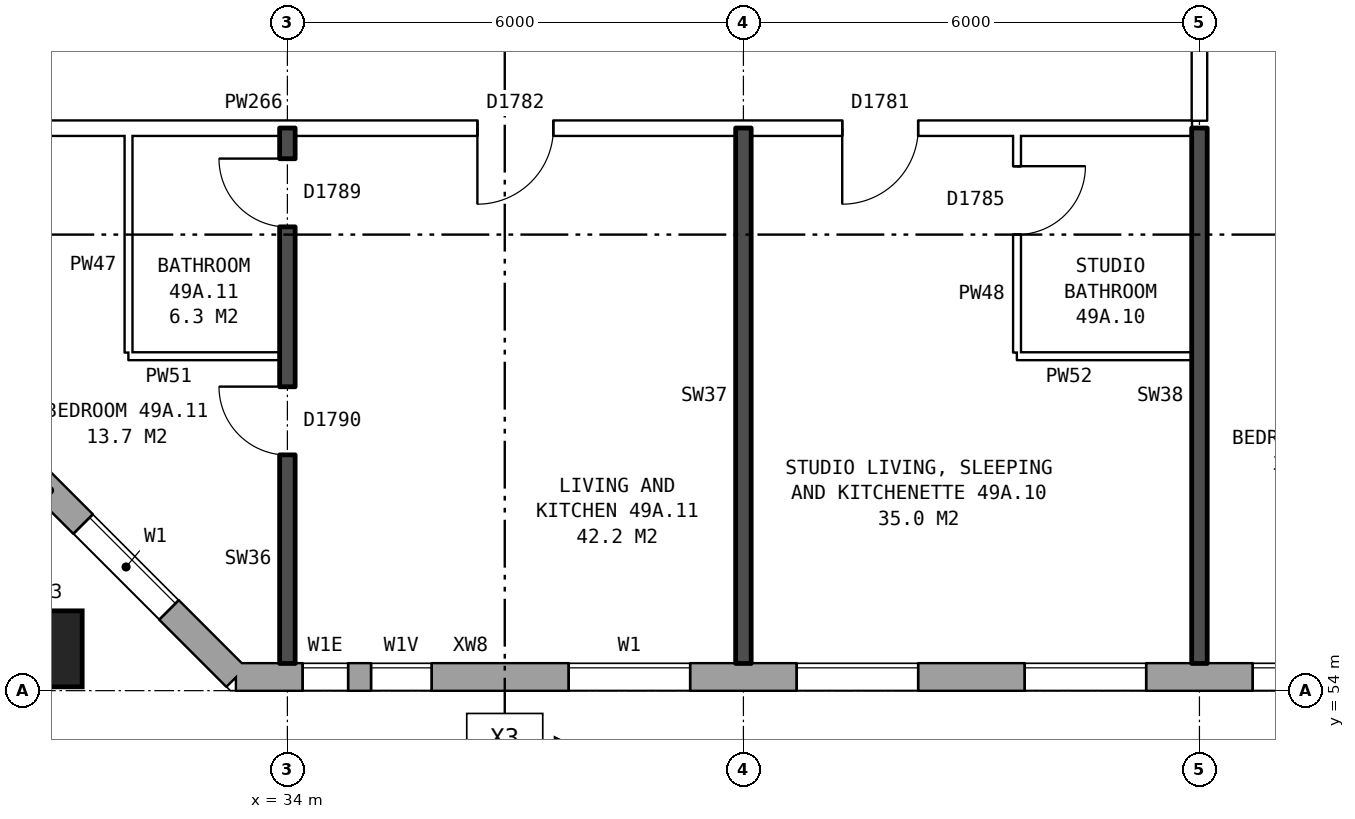
"""IFC4 building model, lengths in metres.
Left out: names, types, materials, properties, quantities, classifications, styles, units other than length and angle.
Written with IfcOpenShell. Run it as: python <this file> out.ifc"""

import sys

from ifc_helpers import new_model, si_unit, direction, frame, frame_2d, origin, origin_2d, place, context, subcontext, project, spatial, rectangle, hollow_rectangle, extrude, element, fill, save


model = new_model("IFC4")
c1 = context("Model", 3, precision=1e-05, world=origin(), true_north=direction((0.0, 1.0)))
c2 = subcontext(c1, "Body", "Model", "MODEL_VIEW")
j1 = project(units=[si_unit("LENGTHUNIT", "METRE"), si_unit("PLANEANGLEUNIT", "RADIAN")], contexts=[c1])
p1 = place(None, origin())
s1 = spatial("IfcSite", under=j1, at=p1, CompositionType="ELEMENT")
p2 = place(p1, origin())
s2 = spatial("IfcBuilding", under=s1, at=p2, CompositionType="ELEMENT")
p3 = place(p2, frame((0.0, 0.0, 175.8)))
s3 = spatial("IfcBuildingStorey", under=s2, at=p3, CompositionType="ELEMENT", Elevation=175.8)
p4 = place(p3, frame((30.8, 54.55, 0.0), z_axis=(0.0, 0.0, 1.0), x_axis=(1.0, 0.0, 0.0)))
e1 = element("IfcColumn", 1, at=p4, inside=s3, PredefinedType="COLUMN", context=c2, shape_type="SweptSolid", body=[
    extrude(hollow_rectangle(XDim=1.0, YDim=1.0, WallThickness=0.055, at=origin_2d()), origin(), (0.0, 0.0, 1.0), 3.1),
])
p5 = place(p3, frame((30.43, 57.075, 0.0), z_axis=(0.0, 0.0, 1.0), x_axis=(0.707106781187, -0.707106781187, 0.0)))
e2 = element("IfcWall", 2, at=p5, inside=s3, PredefinedType="STANDARD", context=c2, shape_type="SweptSolid", body=[
    extrude(rectangle(XDim=4.094, YDim=0.36, at=frame_2d((2.047, 0.0))), origin(), (0.0, 0.0, 1.0), 2.85),
])
p6 = place(p5, frame((1.247, 0.0, 0.8)))
e3 = element("IfcOpeningElement", 3, at=p6, cuts=e2, PredefinedType="OPENING", context=c2, shape_type="SweptSolid", body=[
    extrude(rectangle(XDim=1.6, YDim=1.8, at=frame_2d((0.8, 0.9))), frame((0.0, 0.19, 0.0), z_axis=(0.0, -1.0, 0.0), x_axis=(1.0, 0.0, 0.0)), (0.0, 0.0, 1.0), 0.38),
])
p7 = place(p3, frame((33.325, 54.18, 0.0), z_axis=(0.0, 0.0, 1.0), x_axis=(1.0, 0.0, 0.0)))
e4 = element("IfcWall", 4, at=p7, inside=s3, PredefinedType="STANDARD", context=c2, shape_type="SweptSolid", body=[
    extrude(rectangle(XDim=39.601, YDim=0.36, at=frame_2d((19.8, 0.0))), origin(), (0.0, 0.0, 1.0), 2.85),
])
p8 = place(p7, frame((0.875, 0.0, 0.8)))
e5 = element("IfcOpeningElement", 5, at=p8, cuts=e4, PredefinedType="OPENING", context=c2, shape_type="SweptSolid", body=[
    extrude(rectangle(XDim=0.6, YDim=1.8, at=frame_2d((0.3, 0.9))), frame((0.0, 0.19, 0.0), z_axis=(0.0, -1.0, 0.0), x_axis=(1.0, 0.0, 0.0)), (0.0, 0.0, 1.0), 0.38),
])
p9 = place(p7, frame((4.375, 0.0, 0.8)))
e6 = element("IfcOpeningElement", 6, at=p9, cuts=e4, PredefinedType="OPENING", context=c2, shape_type="SweptSolid", body=[
    extrude(rectangle(XDim=1.6, YDim=1.8, at=frame_2d((0.8, 0.9))), frame((0.0, 0.19, 0.0), z_axis=(0.0, -1.0, 0.0), x_axis=(1.0, 0.0, 0.0)), (0.0, 0.0, 1.0), 0.38),
])
p10 = place(p7, frame((7.375, 0.0, 0.8)))
e7 = element("IfcOpeningElement", 7, at=p10, cuts=e4, PredefinedType="OPENING", context=c2, shape_type="SweptSolid", body=[
    extrude(rectangle(XDim=1.6, YDim=1.8, at=frame_2d((0.8, 0.9))), frame((0.0, 0.19, 0.0), z_axis=(0.0, -1.0, 0.0), x_axis=(1.0, 0.0, 0.0)), (0.0, 0.0, 1.0), 0.38),
])
p11 = place(p7, frame((10.375, 0.0, 0.8)))
e8 = element("IfcOpeningElement", 8, at=p11, cuts=e4, PredefinedType="OPENING", context=c2, shape_type="SweptSolid", body=[
    extrude(rectangle(XDim=1.6, YDim=1.8, at=frame_2d((0.8, 0.9))), frame((0.0, 0.19, 0.0), z_axis=(0.0, -1.0, 0.0), x_axis=(1.0, 0.0, 0.0)), (0.0, 0.0, 1.0), 0.38),
])
p12 = place(p7, frame((13.375, 0.0, 0.8)))
e9 = element("IfcOpeningElement", 9, at=p12, cuts=e4, PredefinedType="OPENING", context=c2, shape_type="SweptSolid", body=[
    extrude(rectangle(XDim=1.6, YDim=1.8, at=frame_2d((0.8, 0.9))), frame((0.0, 0.19, 0.0), z_axis=(0.0, -1.0, 0.0), x_axis=(1.0, 0.0, 0.0)), (0.0, 0.0, 1.0), 0.38),
])
p13 = place(p7, frame((16.375, 0.0, 0.8)))
e10 = element("IfcOpeningElement", 10, at=p13, cuts=e4, PredefinedType="OPENING", context=c2, shape_type="SweptSolid", body=[
    extrude(rectangle(XDim=1.6, YDim=1.8, at=frame_2d((0.8, 0.9))), frame((0.0, 0.19, 0.0), z_axis=(0.0, -1.0, 0.0), x_axis=(1.0, 0.0, 0.0)), (0.0, 0.0, 1.0), 0.38),
])
p14 = place(p7, frame((19.375, 0.0, 0.8)))
e11 = element("IfcOpeningElement", 11, at=p14, cuts=e4, PredefinedType="OPENING", context=c2, shape_type="SweptSolid", body=[
    extrude(rectangle(XDim=1.6, YDim=1.8, at=frame_2d((0.8, 0.9))), frame((0.0, 0.19, 0.0), z_axis=(0.0, -1.0, 0.0), x_axis=(1.0, 0.0, 0.0)), (0.0, 0.0, 1.0), 0.38),
])
p15 = place(p7, frame((22.375, 0.0, 0.8)))
e12 = element("IfcOpeningElement", 12, at=p15, cuts=e4, PredefinedType="OPENING", context=c2, shape_type="SweptSolid", body=[
    extrude(rectangle(XDim=1.6, YDim=1.8, at=frame_2d((0.8, 0.9))), frame((0.0, 0.19, 0.0), z_axis=(0.0, -1.0, 0.0), x_axis=(1.0, 0.0, 0.0)), (0.0, 0.0, 1.0), 0.38),
])
p16 = place(p7, frame((25.375, 0.0, 0.8)))
e13 = element("IfcOpeningElement", 13, at=p16, cuts=e4, PredefinedType="OPENING", context=c2, shape_type="SweptSolid", body=[
    extrude(rectangle(XDim=1.6, YDim=1.8, at=frame_2d((0.8, 0.9))), frame((0.0, 0.19, 0.0), z_axis=(0.0, -1.0, 0.0), x_axis=(1.0, 0.0, 0.0)), (0.0, 0.0, 1.0), 0.38),
])
p17 = place(p7, frame((28.375, 0.0, 0.8)))
e14 = element("IfcOpeningElement", 14, at=p17, cuts=e4, PredefinedType="OPENING", context=c2, shape_type="SweptSolid", body=[
    extrude(rectangle(XDim=1.6, YDim=1.8, at=frame_2d((0.8, 0.9))), frame((0.0, 0.19, 0.0), z_axis=(0.0, -1.0, 0.0), x_axis=(1.0, 0.0, 0.0)), (0.0, 0.0, 1.0), 0.38),
])
p18 = place(p7, frame((31.375, 0.0, 0.8)))
e15 = element("IfcOpeningElement", 15, at=p18, cuts=e4, PredefinedType="OPENING", context=c2, shape_type="SweptSolid", body=[
    extrude(rectangle(XDim=1.6, YDim=1.8, at=frame_2d((0.8, 0.9))), frame((0.0, 0.19, 0.0), z_axis=(0.0, -1.0, 0.0), x_axis=(1.0, 0.0, 0.0)), (0.0, 0.0, 1.0), 0.38),
])
p19 = place(p7, frame((33.275, 0.0, 0.8)))
e16 = element("IfcOpeningElement", 16, at=p19, cuts=e4, PredefinedType="OPENING", context=c2, shape_type="SweptSolid", body=[
    extrude(rectangle(XDim=1.6, YDim=1.8, at=frame_2d((0.8, 0.9))), frame((0.0, 0.19, 0.0), z_axis=(0.0, -1.0, 0.0), x_axis=(1.0, 0.0, 0.0)), (0.0, 0.0, 1.0), 0.38),
])
p20 = place(p7, frame((37.025, 0.0, 1.7)))
e17 = element("IfcOpeningElement", 17, at=p20, cuts=e4, PredefinedType="OPENING", context=c2, shape_type="SweptSolid", body=[
    extrude(rectangle(XDim=0.6, YDim=0.9, at=frame_2d((0.3, 0.45))), frame((0.0, 0.19, 0.0), z_axis=(0.0, -1.0, 0.0), x_axis=(1.0, 0.0, 0.0)), (0.0, 0.0, 1.0), 0.38),
])
p21 = place(p7, frame((1.775, 0.0, 1.7)))
e18 = element("IfcOpeningElement", 18, at=p21, cuts=e4, PredefinedType="OPENING", context=c2, shape_type="SweptSolid", body=[
    extrude(rectangle(XDim=0.8, YDim=0.9, at=frame_2d((0.4, 0.45))), frame((0.0, 0.19, 0.0), z_axis=(0.0, -1.0, 0.0), x_axis=(1.0, 0.0, 0.0)), (0.0, 0.0, 1.0), 0.38),
])
p22 = place(p7, frame((35.175, 0.0, 0.8)))
e19 = element("IfcOpeningElement", 19, at=p22, cuts=e4, PredefinedType="OPENING", context=c2, shape_type="SweptSolid", body=[
    extrude(rectangle(XDim=0.6, YDim=0.9, at=frame_2d((0.3, 0.45))), frame((0.0, 0.19, 0.0), z_axis=(0.0, -1.0, 0.0), x_axis=(1.0, 0.0, 0.0)), (0.0, 0.0, 1.0), 0.38),
])
p23 = place(p7, frame((37.975, 0.0, 0.8)))
e20 = element("IfcOpeningElement", 20, at=p23, cuts=e4, PredefinedType="OPENING", context=c2, shape_type="SweptSolid", body=[
    extrude(rectangle(XDim=1.2, YDim=1.8, at=frame_2d((0.6, 0.9))), frame((0.0, 0.19, 0.0), z_axis=(0.0, -1.0, 0.0), x_axis=(1.0, 0.0, 0.0)), (0.0, 0.0, 1.0), 0.38),
])
p24 = place(p3, frame((31.91, 58.4, 0.0), z_axis=(0.0, 0.0, 1.0), x_axis=(1.0, 0.0, 0.0)))
e21 = element("IfcWall", 21, at=p24, inside=s3, PredefinedType="PARTITIONING", context=c2, shape_type="SweptSolid", body=[
    extrude(rectangle(XDim=1.99, YDim=0.1, at=frame_2d((0.995, 0.0))), origin(), (0.0, 0.0, 1.0), 2.85),
])
p25 = place(p3, frame((43.6, 58.4, 0.0), z_axis=(0.0, 0.0, 1.0), x_axis=(1.0, 0.0, 0.0)))
e22 = element("IfcWall", 22, at=p25, inside=s3, PredefinedType="PARTITIONING", context=c2, shape_type="SweptSolid", body=[
    extrude(rectangle(XDim=2.3, YDim=0.1, at=frame_2d((1.15, 0.0))), origin(), (0.0, 0.0, 1.0), 2.85),
])
p26 = place(p3, frame((30.61, 61.4, 0.0), z_axis=(0.0, 0.0, 1.0), x_axis=(1.0, 0.0, 0.0)))
e23 = element("IfcWall", 23, at=p26, inside=s3, PredefinedType="PARTITIONING", context=c2, shape_type="SweptSolid", body=[
    extrude(rectangle(XDim=15.29, YDim=0.2, at=frame_2d((7.645, 0.0))), origin(), (0.0, 0.0, 1.0), 2.85),
])
p27 = place(p26, frame((10.69, 0.0, 0.0)))
e24 = element("IfcOpeningElement", 24, at=p27, cuts=e23, PredefinedType="OPENING", context=c2, shape_type="SweptSolid", body=[
    extrude(rectangle(XDim=1.0, YDim=2.1, at=frame_2d((0.5, 1.05))), frame((0.0, 0.11, 0.0), z_axis=(0.0, -1.0, 0.0), x_axis=(1.0, 0.0, 0.0)), (0.0, 0.0, 1.0), 0.22),
])
p28 = place(p26, frame((5.89, 0.0, 0.0)))
e25 = element("IfcOpeningElement", 25, at=p28, cuts=e23, PredefinedType="OPENING", context=c2, shape_type="SweptSolid", body=[
    extrude(rectangle(XDim=1.0, YDim=2.1, at=frame_2d((0.5, 1.05))), frame((0.0, 0.11, 0.0), z_axis=(0.0, -1.0, 0.0), x_axis=(1.0, 0.0, 0.0)), (0.0, 0.0, 1.0), 0.22),
])
p29 = place(p3, frame((31.91, 58.45, 0.0), z_axis=(0.0, 0.0, 1.0), x_axis=(0.0, 1.0, 0.0)))
e26 = element("IfcWall", 26, at=p29, inside=s3, PredefinedType="PARTITIONING", context=c2, shape_type="SweptSolid", body=[
    extrude(rectangle(XDim=2.85, YDim=0.1, at=frame_2d((1.425, 0.0))), origin(), (0.0, 0.0, 1.0), 2.85),
])
p30 = place(p3, frame((34.0, 54.36, 0.0), z_axis=(0.0, 0.0, 1.0), x_axis=(0.0, 1.0, 0.0)))
e27 = element("IfcWall", 27, at=p30, inside=s3, PredefinedType="SOLIDWALL", context=c2, shape_type="SweptSolid", body=[
    extrude(rectangle(XDim=7.04, YDim=0.2, at=frame_2d((3.52, 0.0))), origin(), (0.0, 0.0, 1.0), 2.85),
])
p31 = place(p30, frame((2.74, 0.0, 0.0)))
e28 = element("IfcOpeningElement", 28, at=p31, cuts=e27, PredefinedType="OPENING", context=c2, shape_type="SweptSolid", body=[
    extrude(rectangle(XDim=0.9, YDim=2.1, at=frame_2d((0.45, 1.05))), frame((0.0, 0.11, 0.0), z_axis=(0.0, -1.0, 0.0), x_axis=(1.0, 0.0, 0.0)), (0.0, 0.0, 1.0), 0.22),
])
p32 = place(p30, frame((5.74, 0.0, 0.0)))
e29 = element("IfcOpeningElement", 29, at=p32, cuts=e27, PredefinedType="OPENING", context=c2, shape_type="SweptSolid", body=[
    extrude(rectangle(XDim=0.9, YDim=2.1, at=frame_2d((0.45, 1.05))), frame((0.0, 0.11, 0.0), z_axis=(0.0, -1.0, 0.0), x_axis=(1.0, 0.0, 0.0)), (0.0, 0.0, 1.0), 0.22),
])
p33 = place(p3, frame((40.0, 54.36, 0.0), z_axis=(0.0, 0.0, 1.0), x_axis=(0.0, 1.0, 0.0)))
e30 = element("IfcWall", 30, at=p33, inside=s3, PredefinedType="SOLIDWALL", context=c2, shape_type="SweptSolid", body=[
    extrude(rectangle(XDim=7.04, YDim=0.2, at=frame_2d((3.52, 0.0))), origin(), (0.0, 0.0, 1.0), 2.85),
])
p34 = place(p3, frame((43.6, 58.45, 0.0), z_axis=(0.0, 0.0, 1.0), x_axis=(0.0, 1.0, 0.0)))
e31 = element("IfcWall", 31, at=p34, inside=s3, PredefinedType="PARTITIONING", context=c2, shape_type="SweptSolid", body=[
    extrude(rectangle(XDim=2.85, YDim=0.1, at=frame_2d((1.425, 0.0))), origin(), (0.0, 0.0, 1.0), 2.85),
])
p35 = place(p34, frame((1.55, 0.0, 0.0)))
e32 = element("IfcOpeningElement", 32, at=p35, cuts=e31, PredefinedType="OPENING", context=c2, shape_type="SweptSolid", body=[
    extrude(rectangle(XDim=0.9, YDim=2.1, at=frame_2d((0.45, 1.05))), frame((0.0, 0.06, 0.0), z_axis=(0.0, -1.0, 0.0), x_axis=(1.0, 0.0, 0.0)), (0.0, 0.0, 1.0), 0.12),
])
p36 = place(p3, frame((46.0, 54.36, 0.0), z_axis=(0.0, 0.0, 1.0), x_axis=(0.0, 1.0, 0.0)))
e33 = element("IfcWall", 33, at=p36, inside=s3, PredefinedType="SOLIDWALL", context=c2, shape_type="SweptSolid", body=[
    extrude(rectangle(XDim=7.04, YDim=0.2, at=frame_2d((3.52, 0.0))), origin(), (0.0, 0.0, 1.0), 2.85),
])
p37 = place(p3, frame((46.0, 61.5, 0.0), z_axis=(0.0, 0.0, 1.0), x_axis=(0.0, 1.0, 0.0)))
e34 = element("IfcWall", 34, at=p37, inside=s3, PredefinedType="PARTITIONING", context=c2, shape_type="SweptSolid", body=[
    extrude(rectangle(XDim=2.2, YDim=0.2, at=frame_2d((1.1, 0.0))), origin(), (0.0, 0.0, 1.0), 2.85),
])
p38 = place(p6, origin())
e35 = element("IfcWindow", 35, at=p38, inside=s3, PartitioningType="SINGLE_PANEL", PredefinedType="WINDOW", context=c2, shape_type="SweptSolid", body=[
    extrude(rectangle(XDim=1.6, YDim=1.8, at=frame_2d((0.8, 0.9))), frame((0.0, 0.15, 0.0), z_axis=(0.0, -1.0, 0.0), x_axis=(1.0, 0.0, 0.0)), (0.0, 0.0, 1.0), 0.06),
])
fill(e3, e35)
p39 = place(p8, origin())
e36 = element("IfcWindow", 36, at=p39, inside=s3, PartitioningType="SINGLE_PANEL", PredefinedType="WINDOW", context=c2, shape_type="SweptSolid", body=[
    extrude(rectangle(XDim=0.6, YDim=1.8, at=frame_2d((0.3, 0.9))), frame((0.0, 0.15, 0.0), z_axis=(0.0, -1.0, 0.0), x_axis=(1.0, 0.0, 0.0)), (0.0, 0.0, 1.0), 0.06),
])
fill(e5, e36)
p40 = place(p9, origin())
e37 = element("IfcWindow", 37, at=p40, inside=s3, PartitioningType="SINGLE_PANEL", PredefinedType="WINDOW", context=c2, shape_type="SweptSolid", body=[
    extrude(rectangle(XDim=1.6, YDim=1.8, at=frame_2d((0.8, 0.9))), frame((0.0, 0.15, 0.0), z_axis=(0.0, -1.0, 0.0), x_axis=(1.0, 0.0, 0.0)), (0.0, 0.0, 1.0), 0.06),
])
fill(e6, e37)
p41 = place(p10, origin())
e38 = element("IfcWindow", 38, at=p41, inside=s3, PartitioningType="SINGLE_PANEL", PredefinedType="WINDOW", context=c2, shape_type="SweptSolid", body=[
    extrude(rectangle(XDim=1.6, YDim=1.8, at=frame_2d((0.8, 0.9))), frame((0.0, 0.15, 0.0), z_axis=(0.0, -1.0, 0.0), x_axis=(1.0, 0.0, 0.0)), (0.0, 0.0, 1.0), 0.06),
])
fill(e7, e38)
p42 = place(p11, origin())
e39 = element("IfcWindow", 39, at=p42, inside=s3, PartitioningType="SINGLE_PANEL", PredefinedType="WINDOW", context=c2, shape_type="SweptSolid", body=[
    extrude(rectangle(XDim=1.6, YDim=1.8, at=frame_2d((0.8, 0.9))), frame((0.0, 0.15, 0.0), z_axis=(0.0, -1.0, 0.0), x_axis=(1.0, 0.0, 0.0)), (0.0, 0.0, 1.0), 0.06),
])
fill(e8, e39)
p43 = place(p12, origin())
e40 = element("IfcWindow", 40, at=p43, inside=s3, PartitioningType="SINGLE_PANEL", PredefinedType="WINDOW", context=c2, shape_type="SweptSolid", body=[
    extrude(rectangle(XDim=1.6, YDim=1.8, at=frame_2d((0.8, 0.9))), frame((0.0, 0.15, 0.0), z_axis=(0.0, -1.0, 0.0), x_axis=(1.0, 0.0, 0.0)), (0.0, 0.0, 1.0), 0.06),
])
fill(e9, e40)
p44 = place(p27, frame((1.0, 0.0, 0.0), z_axis=(0.0, 0.0, 1.0), x_axis=(-1.0, 0.0, 0.0)))
e41 = element("IfcDoor", 41, at=p44, inside=s3, OperationType="SINGLE_SWING_RIGHT", PredefinedType="DOOR", context=c2, shape_type="SweptSolid", body=[
    extrude(rectangle(XDim=1.0, YDim=2.1, at=frame_2d((0.5, 1.05))), frame((0.0, 0.025, 0.0), z_axis=(0.0, -1.0, 0.0), x_axis=(1.0, 0.0, 0.0)), (0.0, 0.0, 1.0), 0.05),
])
fill(e24, e41)
p45 = place(p35, frame((0.9, 0.0, 0.0), z_axis=(0.0, 0.0, 1.0), x_axis=(-1.0, 0.0, 0.0)))
e42 = element("IfcDoor", 42, at=p45, inside=s3, OperationType="SINGLE_SWING_LEFT", PredefinedType="DOOR", context=c2, shape_type="SweptSolid", body=[
    extrude(rectangle(XDim=0.9, YDim=2.1, at=frame_2d((0.45, 1.05))), frame((0.0, 0.025, 0.0), z_axis=(0.0, -1.0, 0.0), x_axis=(1.0, 0.0, 0.0)), (0.0, 0.0, 1.0), 0.05),
])
fill(e32, e42)
p46 = place(p31, origin())
e43 = element("IfcDoor", 43, at=p46, inside=s3, OperationType="SINGLE_SWING_RIGHT", PredefinedType="DOOR", context=c2, shape_type="SweptSolid", body=[
    extrude(rectangle(XDim=0.9, YDim=2.1, at=frame_2d((0.45, 1.05))), frame((0.0, 0.025, 0.0), z_axis=(0.0, -1.0, 0.0), x_axis=(1.0, 0.0, 0.0)), (0.0, 0.0, 1.0), 0.05),
])
fill(e28, e43)
p47 = place(p28, frame((1.0, 0.0, 0.0), z_axis=(0.0, 0.0, 1.0), x_axis=(-1.0, 0.0, 0.0)))
e44 = element("IfcDoor", 44, at=p47, inside=s3, OperationType="SINGLE_SWING_RIGHT", PredefinedType="DOOR", context=c2, shape_type="SweptSolid", body=[
    extrude(rectangle(XDim=1.0, YDim=2.1, at=frame_2d((0.5, 1.05))), frame((0.0, 0.025, 0.0), z_axis=(0.0, -1.0, 0.0), x_axis=(1.0, 0.0, 0.0)), (0.0, 0.0, 1.0), 0.05),
])
fill(e25, e44)
p48 = place(p32, origin())
e45 = element("IfcDoor", 45, at=p48, inside=s3, OperationType="SINGLE_SWING_RIGHT", PredefinedType="DOOR", context=c2, shape_type="SweptSolid", body=[
    extrude(rectangle(XDim=0.9, YDim=2.1, at=frame_2d((0.45, 1.05))), frame((0.0, 0.025, 0.0), z_axis=(0.0, -1.0, 0.0), x_axis=(1.0, 0.0, 0.0)), (0.0, 0.0, 1.0), 0.05),
])
fill(e29, e45)
p49 = place(p21, origin())
e46 = element("IfcWindow", 46, at=p49, inside=s3, PartitioningType="SINGLE_PANEL", PredefinedType="WINDOW", context=c2, shape_type="SweptSolid", body=[
    extrude(rectangle(XDim=0.8, YDim=0.9, at=frame_2d((0.4, 0.45))), frame((0.0, 0.15, 0.0), z_axis=(0.0, -1.0, 0.0), x_axis=(1.0, 0.0, 0.0)), (0.0, 0.0, 1.0), 0.06),
])
fill(e18, e46)
save(model, sys.argv[1])
